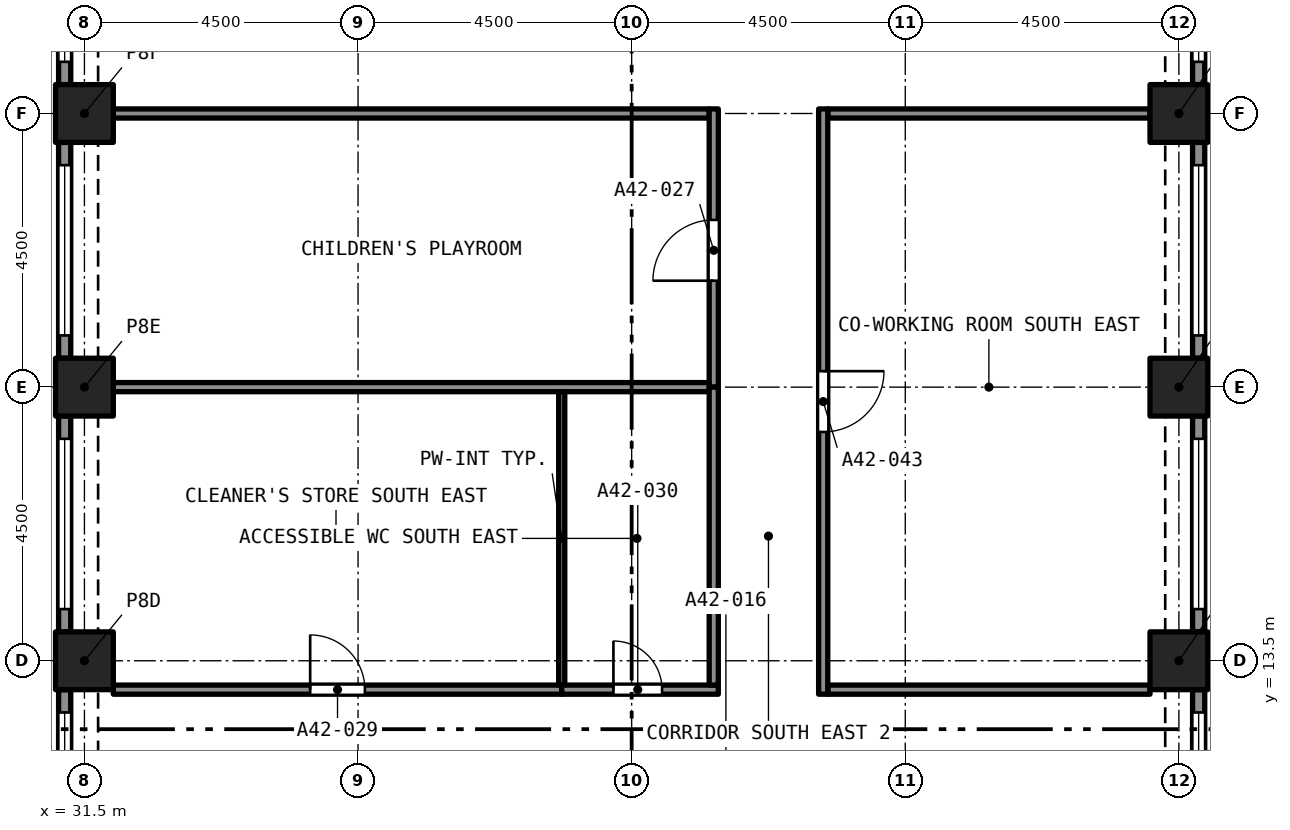
"""IFC4 building model, lengths in metres.
Left out: names, types, materials, properties, quantities, classifications, styles, units other than length and angle.
Written with IfcOpenShell. Run it as: python <this file> out.ifc"""

import sys

from ifc_helpers import new_model, si_unit, direction, frame, frame_2d, origin, origin_2d, place, context, subcontext, project, spatial, rectangle, extrude, element, fill, save


model = new_model("IFC4")
c1 = context("Model", 3, precision=1e-05, world=origin(), true_north=direction((0.0, 1.0)))
c2 = subcontext(c1, "Body", "Model", "MODEL_VIEW")
j1 = project(units=[si_unit("LENGTHUNIT", "METRE"), si_unit("PLANEANGLEUNIT", "RADIAN")], contexts=[c1])
p1 = place(None, origin())
s1 = spatial("IfcSite", under=j1, at=p1, CompositionType="ELEMENT")
p2 = place(p1, origin())
s2 = spatial("IfcBuilding", under=s1, at=p2, CompositionType="ELEMENT")
p3 = place(p2, frame((0.0, 0.0, 150.6)))
s3 = spatial("IfcBuildingStorey", under=s2, at=p3, CompositionType="ELEMENT", Elevation=150.6)
for number, where, z_axis, x_axis in (
    (1, (31.5, 13.5, 0.0), (0.0, 0.0, 1.0), (1.0, 0.0, 0.0)),
    (2, (49.5, 13.5, 0.0), (0.0, 0.0, 1.0), (1.0, 0.0, 0.0)),
    (3, (31.5, 18.0, 0.0), (0.0, 0.0, 1.0), (1.0, 0.0, 0.0)),
    (4, (49.5, 18.0, 0.0), (0.0, 0.0, 1.0), (1.0, 0.0, 0.0)),
    (5, (31.5, 22.5, 0.0), (0.0, 0.0, 1.0), (1.0, 0.0, 0.0)),
    (6, (49.5, 22.5, 0.0), (0.0, 0.0, 1.0), (1.0, 0.0, 0.0)),
):
    element("IfcColumn", number, at=place(p3, frame(where, z_axis=z_axis, x_axis=x_axis)), inside=s3, PredefinedType="COLUMN", context=c2, shape_type="SweptSolid", body=[
        extrude(rectangle(XDim=0.95, YDim=0.95, at=origin_2d()), origin(), (0.0, 0.0, 1.0), 4.4),
    ])
p4 = place(p3, frame((49.825, 13.025, 0.0), z_axis=(0.0, 0.0, 1.0), x_axis=(0.0, -1.0, 0.0)))
e7 = element("IfcWall", 7, at=p4, inside=s3, PredefinedType="SOLIDWALL", context=c2, shape_type="SweptSolid", body=[
    extrude(rectangle(XDim=3.55, YDim=0.2, at=frame_2d((1.775, 0.0))), origin(), (0.0, 0.0, 1.0), 4.4),
])
p5 = place(p4, frame((0.375, 0.0, 0.45)))
e8 = element("IfcOpeningElement", 8, at=p5, cuts=e7, PredefinedType="OPENING", context=c2, shape_type="SweptSolid", body=[
    extrude(rectangle(XDim=2.8, YDim=2.55, at=frame_2d((1.4, 1.275))), frame((0.0, 0.11, 0.0), z_axis=(0.0, -1.0, 0.0), x_axis=(1.0, 0.0, 0.0)), (0.0, 0.0, 1.0), 0.22),
])
p6 = place(p3, frame((49.825, 17.525, 0.0), z_axis=(0.0, 0.0, 1.0), x_axis=(0.0, -1.0, 0.0)))
e9 = element("IfcWall", 9, at=p6, inside=s3, PredefinedType="SOLIDWALL", context=c2, shape_type="SweptSolid", body=[
    extrude(rectangle(XDim=3.55, YDim=0.2, at=frame_2d((1.775, 0.0))), origin(), (0.0, 0.0, 1.0), 4.4),
])
p7 = place(p6, frame((0.375, 0.0, 0.45)))
e10 = element("IfcOpeningElement", 10, at=p7, cuts=e9, PredefinedType="OPENING", context=c2, shape_type="SweptSolid", body=[
    extrude(rectangle(XDim=2.8, YDim=2.55, at=frame_2d((1.4, 1.275))), frame((0.0, 0.11, 0.0), z_axis=(0.0, -1.0, 0.0), x_axis=(1.0, 0.0, 0.0)), (0.0, 0.0, 1.0), 0.22),
])
p8 = place(p3, frame((49.825, 22.025, 0.0), z_axis=(0.0, 0.0, 1.0), x_axis=(0.0, -1.0, 0.0)))
e11 = element("IfcWall", 11, at=p8, inside=s3, PredefinedType="SOLIDWALL", context=c2, shape_type="SweptSolid", body=[
    extrude(rectangle(XDim=3.55, YDim=0.2, at=frame_2d((1.775, 0.0))), origin(), (0.0, 0.0, 1.0), 4.4),
])
p9 = place(p8, frame((0.375, 0.0, 0.45)))
e12 = element("IfcOpeningElement", 12, at=p9, cuts=e11, PredefinedType="OPENING", context=c2, shape_type="SweptSolid", body=[
    extrude(rectangle(XDim=2.8, YDim=2.55, at=frame_2d((1.4, 1.275))), frame((0.0, 0.11, 0.0), z_axis=(0.0, -1.0, 0.0), x_axis=(1.0, 0.0, 0.0)), (0.0, 0.0, 1.0), 0.22),
])
p10 = place(p3, frame((49.825, 26.525, 0.0), z_axis=(0.0, 0.0, 1.0), x_axis=(0.0, -1.0, 0.0)))
e13 = element("IfcWall", 13, at=p10, inside=s3, PredefinedType="SOLIDWALL", context=c2, shape_type="SweptSolid", body=[
    extrude(rectangle(XDim=3.55, YDim=0.2, at=frame_2d((1.775, 0.0))), origin(), (0.0, 0.0, 1.0), 4.4),
])
p11 = place(p10, frame((0.375, 0.0, 0.45)))
e14 = element("IfcOpeningElement", 14, at=p11, cuts=e13, PredefinedType="OPENING", context=c2, shape_type="SweptSolid", body=[
    extrude(rectangle(XDim=2.8, YDim=2.55, at=frame_2d((1.4, 1.275))), frame((0.0, 0.11, 0.0), z_axis=(0.0, -1.0, 0.0), x_axis=(1.0, 0.0, 0.0)), (0.0, 0.0, 1.0), 0.22),
])
p12 = place(p3, frame((31.175, 22.975, 0.0), z_axis=(0.0, 0.0, 1.0), x_axis=(0.0, 1.0, 0.0)))
e15 = element("IfcWall", 15, at=p12, inside=s3, PredefinedType="SOLIDWALL", context=c2, shape_type="SweptSolid", body=[
    extrude(rectangle(XDim=3.55, YDim=0.2, at=frame_2d((1.775, 0.0))), origin(), (0.0, 0.0, 1.0), 4.4),
])
p13 = place(p12, frame((0.375, 0.0, 0.45)))
e16 = element("IfcOpeningElement", 16, at=p13, cuts=e15, PredefinedType="OPENING", context=c2, shape_type="SweptSolid", body=[
    extrude(rectangle(XDim=2.8, YDim=2.55, at=frame_2d((1.4, 1.275))), frame((0.0, 0.11, 0.0), z_axis=(0.0, -1.0, 0.0), x_axis=(1.0, 0.0, 0.0)), (0.0, 0.0, 1.0), 0.22),
])
p14 = place(p3, frame((31.175, 18.475, 0.0), z_axis=(0.0, 0.0, 1.0), x_axis=(0.0, 1.0, 0.0)))
e17 = element("IfcWall", 17, at=p14, inside=s3, PredefinedType="SOLIDWALL", context=c2, shape_type="SweptSolid", body=[
    extrude(rectangle(XDim=3.55, YDim=0.2, at=frame_2d((1.775, 0.0))), origin(), (0.0, 0.0, 1.0), 4.4),
])
p15 = place(p14, frame((0.375, 0.0, 0.45)))
e18 = element("IfcOpeningElement", 18, at=p15, cuts=e17, PredefinedType="OPENING", context=c2, shape_type="SweptSolid", body=[
    extrude(rectangle(XDim=2.8, YDim=2.55, at=frame_2d((1.4, 1.275))), frame((0.0, 0.11, 0.0), z_axis=(0.0, -1.0, 0.0), x_axis=(1.0, 0.0, 0.0)), (0.0, 0.0, 1.0), 0.22),
])
p16 = place(p3, frame((31.175, 13.975, 0.0), z_axis=(0.0, 0.0, 1.0), x_axis=(0.0, 1.0, 0.0)))
e19 = element("IfcWall", 19, at=p16, inside=s3, PredefinedType="SOLIDWALL", context=c2, shape_type="SweptSolid", body=[
    extrude(rectangle(XDim=3.55, YDim=0.2, at=frame_2d((1.775, 0.0))), origin(), (0.0, 0.0, 1.0), 4.4),
])
p17 = place(p16, frame((0.375, 0.0, 0.45)))
e20 = element("IfcOpeningElement", 20, at=p17, cuts=e19, PredefinedType="OPENING", context=c2, shape_type="SweptSolid", body=[
    extrude(rectangle(XDim=2.8, YDim=2.55, at=frame_2d((1.4, 1.275))), frame((0.0, 0.11, 0.0), z_axis=(0.0, -1.0, 0.0), x_axis=(1.0, 0.0, 0.0)), (0.0, 0.0, 1.0), 0.22),
])
p18 = place(p3, frame((31.175, 9.475, 0.0), z_axis=(0.0, 0.0, 1.0), x_axis=(0.0, 1.0, 0.0)))
e21 = element("IfcWall", 21, at=p18, inside=s3, PredefinedType="SOLIDWALL", context=c2, shape_type="SweptSolid", body=[
    extrude(rectangle(XDim=3.55, YDim=0.2, at=frame_2d((1.775, 0.0))), origin(), (0.0, 0.0, 1.0), 4.4),
])
p19 = place(p18, frame((0.375, 0.0, 0.45)))
e22 = element("IfcOpeningElement", 22, at=p19, cuts=e21, PredefinedType="OPENING", context=c2, shape_type="SweptSolid", body=[
    extrude(rectangle(XDim=2.8, YDim=2.55, at=frame_2d((1.4, 1.275))), frame((0.0, 0.11, 0.0), z_axis=(0.0, -1.0, 0.0), x_axis=(1.0, 0.0, 0.0)), (0.0, 0.0, 1.0), 0.22),
])
p20 = place(p3, frame((31.975, 22.5, 0.0), z_axis=(0.0, 0.0, 1.0), x_axis=(1.0, 0.0, 0.0)))
e23 = element("IfcWall", 23, at=p20, inside=s3, PredefinedType="PARTITIONING", context=c2, shape_type="SweptSolid", body=[
    extrude(rectangle(XDim=9.8, YDim=0.15, at=frame_2d((4.9, 0.0))), origin(), (0.0, 0.0, 1.0), 4.1),
])
p21 = place(p3, frame((41.85, 18.0, 0.0), z_axis=(0.0, 0.0, 1.0), x_axis=(0.0, 1.0, 0.0)))
e24 = element("IfcWall", 24, at=p21, inside=s3, PredefinedType="PARTITIONING", context=c2, shape_type="SweptSolid", body=[
    extrude(rectangle(XDim=4.575, YDim=0.15, at=frame_2d((2.288, 0.0))), origin(), (0.0, 0.0, 1.0), 4.1),
])
p22 = place(p21, frame((1.75, 0.0, 0.0)))
e25 = element("IfcOpeningElement", 25, at=p22, cuts=e24, PredefinedType="OPENING", context=c2, shape_type="SweptSolid", body=[
    extrude(rectangle(XDim=1.0, YDim=2.1, at=frame_2d((0.5, 1.05))), frame((0.0, 0.085, 0.0), z_axis=(0.0, -1.0, 0.0), x_axis=(1.0, 0.0, 0.0)), (0.0, 0.0, 1.0), 0.17),
])
p23 = place(p3, frame((31.975, 18.0, 0.0), z_axis=(0.0, 0.0, 1.0), x_axis=(1.0, 0.0, 0.0)))
e26 = element("IfcWall", 26, at=p23, inside=s3, PredefinedType="PARTITIONING", context=c2, shape_type="SweptSolid", body=[
    extrude(rectangle(XDim=9.8, YDim=0.15, at=frame_2d((4.9, 0.0))), origin(), (0.0, 0.0, 1.0), 4.1),
])
p24 = place(p3, frame((31.975, 13.025, 0.0), z_axis=(0.0, 0.0, 1.0), x_axis=(1.0, 0.0, 0.0)))
e27 = element("IfcWall", 27, at=p24, inside=s3, PredefinedType="PARTITIONING", context=c2, shape_type="SweptSolid", body=[
    extrude(rectangle(XDim=7.375, YDim=0.15, at=frame_2d((3.688, 0.0))), origin(), (0.0, 0.0, 1.0), 4.1),
])
p25 = place(p24, frame((3.238, 0.0, 0.0)))
e28 = element("IfcOpeningElement", 28, at=p25, cuts=e27, PredefinedType="OPENING", context=c2, shape_type="SweptSolid", body=[
    extrude(rectangle(XDim=0.9, YDim=2.1, at=frame_2d((0.45, 1.05))), frame((0.0, 0.085, 0.0), z_axis=(0.0, -1.0, 0.0), x_axis=(1.0, 0.0, 0.0)), (0.0, 0.0, 1.0), 0.17),
])
p26 = place(p3, frame((39.35, 13.025, 0.0), z_axis=(0.0, 0.0, 1.0), x_axis=(1.0, 0.0, 0.0)))
e29 = element("IfcWall", 29, at=p26, inside=s3, PredefinedType="PARTITIONING", context=c2, shape_type="SweptSolid", body=[
    extrude(rectangle(XDim=2.575, YDim=0.15, at=frame_2d((1.288, 0.0))), origin(), (0.0, 0.0, 1.0), 4.1),
])
p27 = place(p26, frame((0.85, 0.0, 0.0)))
e30 = element("IfcOpeningElement", 30, at=p27, cuts=e29, PredefinedType="OPENING", context=c2, shape_type="SweptSolid", body=[
    extrude(rectangle(XDim=0.8, YDim=2.1, at=frame_2d((0.4, 1.05))), frame((0.0, 0.085, 0.0), z_axis=(0.0, -1.0, 0.0), x_axis=(1.0, 0.0, 0.0)), (0.0, 0.0, 1.0), 0.17),
])
for number, where, z_axis, x_axis in (
    (31, (43.725, 13.025, 0.0), (0.0, 0.0, 1.0), (1.0, 0.0, 0.0)),
    (32, (43.725, 22.5, 0.0), (0.0, 0.0, 1.0), (1.0, 0.0, 0.0)),
):
    element("IfcWall", number, at=place(p3, frame(where, z_axis=z_axis, x_axis=x_axis)), inside=s3, PredefinedType="PARTITIONING", context=c2, shape_type="SweptSolid", body=[
        extrude(rectangle(XDim=5.3, YDim=0.15, at=frame_2d((2.65, 0.0))), origin(), (0.0, 0.0, 1.0), 4.1),
    ])
p28 = place(p3, frame((41.85, 13.1, 0.0), z_axis=(0.0, 0.0, 1.0), x_axis=(0.0, 1.0, 0.0)))
e33 = element("IfcWall", 33, at=p28, inside=s3, PredefinedType="PARTITIONING", context=c2, shape_type="SweptSolid", body=[
    extrude(rectangle(XDim=4.9, YDim=0.15, at=frame_2d((2.45, 0.0))), origin(), (0.0, 0.0, 1.0), 4.1),
])
p29 = place(p3, frame((43.65, 22.575, 0.0), z_axis=(0.0, 0.0, 1.0), x_axis=(0.0, -1.0, 0.0)))
e34 = element("IfcWall", 34, at=p29, inside=s3, PredefinedType="PARTITIONING", context=c2, shape_type="SweptSolid", body=[
    extrude(rectangle(XDim=9.625, YDim=0.15, at=frame_2d((4.812, 0.0))), origin(), (0.0, 0.0, 1.0), 4.1),
])
p30 = place(p29, frame((4.312, 0.0, 0.0)))
e35 = element("IfcOpeningElement", 35, at=p30, cuts=e34, PredefinedType="OPENING", context=c2, shape_type="SweptSolid", body=[
    extrude(rectangle(XDim=1.0, YDim=2.1, at=frame_2d((0.5, 1.05))), frame((0.0, 0.085, 0.0), z_axis=(0.0, -1.0, 0.0), x_axis=(1.0, 0.0, 0.0)), (0.0, 0.0, 1.0), 0.17),
])
p31 = place(p3, frame((39.35, 13.1, 0.0), z_axis=(0.0, 0.0, 1.0), x_axis=(0.0, 1.0, 0.0)))
e36 = element("IfcWall", 36, at=p31, inside=s3, PredefinedType="PARTITIONING", context=c2, shape_type="SweptSolid", body=[
    extrude(rectangle(XDim=4.825, YDim=0.1, at=frame_2d((2.413, 0.0))), origin(), (0.0, 0.0, 1.0), 4.1),
])
p32 = place(p5, origin())
e37 = element("IfcWindow", 37, at=p32, inside=s3, PartitioningType="SINGLE_PANEL", PredefinedType="WINDOW", context=c2, shape_type="SweptSolid", body=[
    extrude(rectangle(XDim=2.8, YDim=2.55, at=frame_2d((1.4, 1.275))), frame((0.0, 0.03, 0.0), z_axis=(0.0, -1.0, 0.0), x_axis=(1.0, 0.0, 0.0)), (0.0, 0.0, 1.0), 0.06),
])
fill(e8, e37)
p33 = place(p7, origin())
e38 = element("IfcWindow", 38, at=p33, inside=s3, PartitioningType="SINGLE_PANEL", PredefinedType="WINDOW", context=c2, shape_type="SweptSolid", body=[
    extrude(rectangle(XDim=2.8, YDim=2.55, at=frame_2d((1.4, 1.275))), frame((0.0, 0.03, 0.0), z_axis=(0.0, -1.0, 0.0), x_axis=(1.0, 0.0, 0.0)), (0.0, 0.0, 1.0), 0.06),
])
fill(e10, e38)
p34 = place(p9, origin())
e39 = element("IfcWindow", 39, at=p34, inside=s3, PartitioningType="SINGLE_PANEL", PredefinedType="WINDOW", context=c2, shape_type="SweptSolid", body=[
    extrude(rectangle(XDim=2.8, YDim=2.55, at=frame_2d((1.4, 1.275))), frame((0.0, 0.03, 0.0), z_axis=(0.0, -1.0, 0.0), x_axis=(1.0, 0.0, 0.0)), (0.0, 0.0, 1.0), 0.06),
])
fill(e12, e39)
p35 = place(p11, origin())
e40 = element("IfcWindow", 40, at=p35, inside=s3, PartitioningType="SINGLE_PANEL", PredefinedType="WINDOW", context=c2, shape_type="SweptSolid", body=[
    extrude(rectangle(XDim=2.8, YDim=2.55, at=frame_2d((1.4, 1.275))), frame((0.0, 0.03, 0.0), z_axis=(0.0, -1.0, 0.0), x_axis=(1.0, 0.0, 0.0)), (0.0, 0.0, 1.0), 0.06),
])
fill(e14, e40)
p36 = place(p13, origin())
e41 = element("IfcWindow", 41, at=p36, inside=s3, PartitioningType="SINGLE_PANEL", PredefinedType="WINDOW", context=c2, shape_type="SweptSolid", body=[
    extrude(rectangle(XDim=2.8, YDim=2.55, at=frame_2d((1.4, 1.275))), frame((0.0, 0.03, 0.0), z_axis=(0.0, -1.0, 0.0), x_axis=(1.0, 0.0, 0.0)), (0.0, 0.0, 1.0), 0.06),
])
fill(e16, e41)
p37 = place(p15, origin())
e42 = element("IfcWindow", 42, at=p37, inside=s3, PartitioningType="SINGLE_PANEL", PredefinedType="WINDOW", context=c2, shape_type="SweptSolid", body=[
    extrude(rectangle(XDim=2.8, YDim=2.55, at=frame_2d((1.4, 1.275))), frame((0.0, 0.03, 0.0), z_axis=(0.0, -1.0, 0.0), x_axis=(1.0, 0.0, 0.0)), (0.0, 0.0, 1.0), 0.06),
])
fill(e18, e42)
p38 = place(p17, origin())
e43 = element("IfcWindow", 43, at=p38, inside=s3, PartitioningType="SINGLE_PANEL", PredefinedType="WINDOW", context=c2, shape_type="SweptSolid", body=[
    extrude(rectangle(XDim=2.8, YDim=2.55, at=frame_2d((1.4, 1.275))), frame((0.0, 0.03, 0.0), z_axis=(0.0, -1.0, 0.0), x_axis=(1.0, 0.0, 0.0)), (0.0, 0.0, 1.0), 0.06),
])
fill(e20, e43)
p39 = place(p19, origin())
e44 = element("IfcWindow", 44, at=p39, inside=s3, PartitioningType="SINGLE_PANEL", PredefinedType="WINDOW", context=c2, shape_type="SweptSolid", body=[
    extrude(rectangle(XDim=2.8, YDim=2.55, at=frame_2d((1.4, 1.275))), frame((0.0, 0.03, 0.0), z_axis=(0.0, -1.0, 0.0), x_axis=(1.0, 0.0, 0.0)), (0.0, 0.0, 1.0), 0.06),
])
fill(e22, e44)
p40 = place(p22, origin())
e45 = element("IfcDoor", 45, at=p40, inside=s3, OperationType="SINGLE_SWING_LEFT", PredefinedType="DOOR", context=c2, shape_type="SweptSolid", body=[
    extrude(rectangle(XDim=1.0, YDim=2.1, at=frame_2d((0.5, 1.05))), frame((0.0, 0.025, 0.0), z_axis=(0.0, -1.0, 0.0), x_axis=(1.0, 0.0, 0.0)), (0.0, 0.0, 1.0), 0.05),
])
fill(e25, e45)
p41 = place(p25, origin())
e46 = element("IfcDoor", 46, at=p41, inside=s3, OperationType="SINGLE_SWING_LEFT", PredefinedType="DOOR", context=c2, shape_type="SweptSolid", body=[
    extrude(rectangle(XDim=0.9, YDim=2.1, at=frame_2d((0.45, 1.05))), frame((0.0, 0.025, 0.0), z_axis=(0.0, -1.0, 0.0), x_axis=(1.0, 0.0, 0.0)), (0.0, 0.0, 1.0), 0.05),
])
fill(e28, e46)
p42 = place(p27, origin())
e47 = element("IfcDoor", 47, at=p42, inside=s3, OperationType="SINGLE_SWING_LEFT", PredefinedType="DOOR", context=c2, shape_type="SweptSolid", body=[
    extrude(rectangle(XDim=0.8, YDim=2.1, at=frame_2d((0.4, 1.05))), frame((0.0, 0.025, 0.0), z_axis=(0.0, -1.0, 0.0), x_axis=(1.0, 0.0, 0.0)), (0.0, 0.0, 1.0), 0.05),
])
fill(e30, e47)
p43 = place(p30, origin())
e48 = element("IfcDoor", 48, at=p43, inside=s3, OperationType="SINGLE_SWING_RIGHT", PredefinedType="DOOR", context=c2, shape_type="SweptSolid", body=[
    extrude(rectangle(XDim=1.0, YDim=2.1, at=frame_2d((0.5, 1.05))), frame((0.0, 0.025, 0.0), z_axis=(0.0, -1.0, 0.0), x_axis=(1.0, 0.0, 0.0)), (0.0, 0.0, 1.0), 0.05),
])
fill(e35, e48)
save(model, sys.argv[1])
